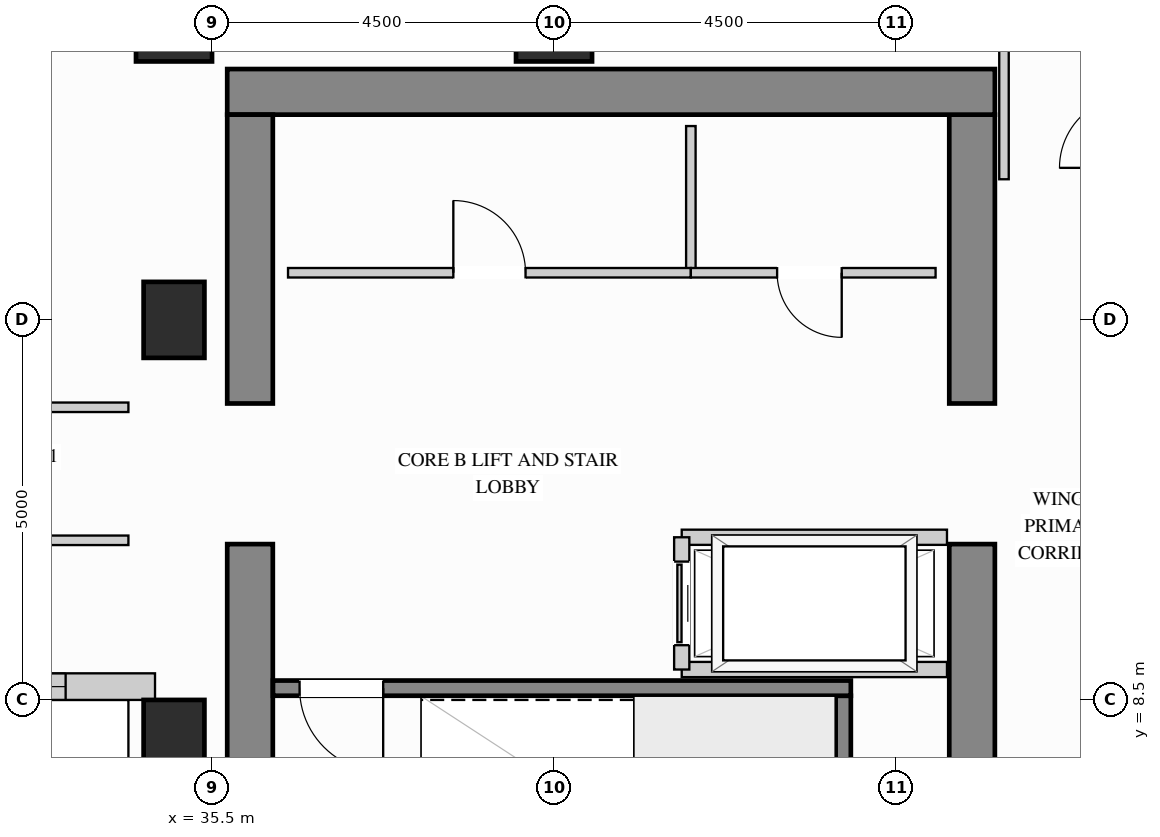
"""IFC4 building model, lengths in metres.
Left out: names, types, materials, properties, quantities, classifications, styles, units other than length and angle.
Written with IfcOpenShell. Run it as: python <this file> out.ifc"""

import sys

from ifc_helpers import new_model, si_unit, direction, frame, frame_2d, origin, origin_2d, place, context, subcontext, project, spatial, rectangle, extrude, source, transform, mapped, element, fill, save


model = new_model("IFC4")
c1 = context("Model", 3, precision=1e-05, world=origin(), true_north=direction((0.0, 1.0)))
c2 = subcontext(c1, "Body", "Model", "MODEL_VIEW")
j1 = project(units=[si_unit("LENGTHUNIT", "METRE"), si_unit("PLANEANGLEUNIT", "RADIAN")], contexts=[c1])
p1 = place(None, origin())
s1 = spatial("IfcSite", under=j1, at=p1, CompositionType="ELEMENT")
p2 = place(p1, origin())
s2 = spatial("IfcBuilding", under=s1, at=p2, CompositionType="ELEMENT")
p3 = place(p2, frame((0.0, 0.0, 186.3)))
s3 = spatial("IfcBuildingStorey", under=s2, at=p3, CompositionType="ELEMENT", Elevation=186.3)
m1 = source(origin(), c2, "Body", "SweptSolid", [
    extrude(rectangle(XDim=0.8, YDim=1.0, at=origin_2d()), origin(), (0.0, 0.0, 1.0), 3.4),
])
for number, where, z_axis, x_axis in (
    (1, (35.0, 13.5, 0.0), (0.0, 0.0, 1.0), (1.0, 0.0, 0.0)),
    (2, (35.0, 8.0, 0.0), (0.0, 0.0, 1.0), (1.0, 0.0, 0.0)),
):
    element("IfcColumn", number, at=place(p3, frame(where, z_axis=z_axis, x_axis=x_axis)), inside=s3, PredefinedType="COLUMN", context=c2, shape_type="MappedRepresentation", body=[
        mapped(m1, transform((0.0, 0.0, 0.0), x_axis=(1.0, 0.0, 0.0), y_axis=(0.0, 1.0, 0.0), z_axis=(0.0, 0.0, 1.0))),
    ])
m2 = source(origin(), c2, "Body", "SweptSolid", [
    extrude(rectangle(XDim=1.0, YDim=1.0, at=origin_2d()), origin(), (0.0, 0.0, 1.0), 3.4),
])
for number, where, z_axis, x_axis in (
    (3, (35.0, 17.4, 0.0), (0.0, 0.0, 1.0), (1.0, 0.0, 0.0)),
    (4, (40.0, 17.4, 0.0), (0.0, 0.0, 1.0), (1.0, 0.0, 0.0)),
):
    element("IfcColumn", number, at=place(p3, frame(where, z_axis=z_axis, x_axis=x_axis)), inside=s3, PredefinedType="COLUMN", context=c2, shape_type="MappedRepresentation", body=[
        mapped(m2, transform((0.0, 0.0, 0.0), x_axis=(1.0, 0.0, 0.0), y_axis=(0.0, 1.0, 0.0), z_axis=(0.0, 0.0, 1.0))),
    ])
m3 = source(origin(), c2, "Body", "SweptSolid", [
    extrude(rectangle(XDim=5.75, YDim=0.6, at=frame_2d((2.875, 0.0))), origin(), (0.0, 0.0, 1.0), 3.4),
])
p4 = place(p3, frame((45.5, 4.8, 0.0), z_axis=(0.0, 0.0, 1.0), x_axis=(0.0, 1.0, 0.0)))
e5 = element("IfcWall", 5, at=p4, inside=s3, PredefinedType="SHEAR", context=c2, shape_type="MappedRepresentation", body=[
    mapped(m3, transform((0.0, 0.0, 0.0), x_axis=(1.0, 0.0, 0.0), y_axis=(0.0, 1.0, 0.0), z_axis=(0.0, 0.0, 1.0))),
])
m4 = source(origin(), c2, "Body", "SweptSolid", [
    extrude(rectangle(XDim=3.8, YDim=0.6, at=frame_2d((1.9, 0.0))), origin(), (0.0, 0.0, 1.0), 3.4),
])
p5 = place(p3, frame((45.5, 12.4, 0.0), z_axis=(0.0, 0.0, 1.0), x_axis=(0.0, 1.0, 0.0)))
e6 = element("IfcWall", 6, at=p5, inside=s3, PredefinedType="SHEAR", context=c2, shape_type="MappedRepresentation", body=[
    mapped(m4, transform((0.0, 0.0, 0.0), x_axis=(1.0, 0.0, 0.0), y_axis=(0.0, 1.0, 0.0), z_axis=(0.0, 0.0, 1.0))),
])
m5 = source(origin(), c2, "Body", "SweptSolid", [
    extrude(rectangle(XDim=10.1, YDim=0.6, at=frame_2d((5.05, 0.0))), origin(), (0.0, 0.0, 1.0), 3.4),
])
p6 = place(p3, frame((35.7, 16.5, 0.0), z_axis=(0.0, 0.0, 1.0), x_axis=(1.0, 0.0, 0.0)))
e7 = element("IfcWall", 7, at=p6, inside=s3, PredefinedType="SHEAR", context=c2, shape_type="MappedRepresentation", body=[
    mapped(m5, transform((0.0, 0.0, 0.0), x_axis=(1.0, 0.0, 0.0), y_axis=(0.0, 1.0, 0.0), z_axis=(0.0, 0.0, 1.0))),
])
p7 = place(p3, frame((36.0, 4.8, 0.0), z_axis=(0.0, 0.0, 1.0), x_axis=(0.0, 1.0, 0.0)))
e8 = element("IfcWall", 8, at=p7, inside=s3, PredefinedType="SHEAR", context=c2, shape_type="MappedRepresentation", body=[
    mapped(m3, transform((0.0, 0.0, 0.0), x_axis=(1.0, 0.0, 0.0), y_axis=(0.0, 1.0, 0.0), z_axis=(0.0, 0.0, 1.0))),
])
p8 = place(p3, frame((36.0, 12.4, 0.0), z_axis=(0.0, 0.0, 1.0), x_axis=(0.0, 1.0, 0.0)))
e9 = element("IfcWall", 9, at=p8, inside=s3, PredefinedType="SHEAR", context=c2, shape_type="MappedRepresentation", body=[
    mapped(m4, transform((0.0, 0.0, 0.0), x_axis=(1.0, 0.0, 0.0), y_axis=(0.0, 1.0, 0.0), z_axis=(0.0, 0.0, 1.0))),
])
p9 = place(p3, frame((30.898, 8.675, 0.0), z_axis=(0.0, 0.0, 1.0), x_axis=(1.0, 0.0, 0.0)))
e10 = element("IfcWall", 10, at=p9, inside=s3, PredefinedType="SOLIDWALL", context=c2, shape_type="SweptSolid", body=[
    extrude(rectangle(XDim=3.852, YDim=0.35, at=frame_2d((1.926, 0.0))), origin(), (0.0, 0.0, 1.0), 3.385),
])
p10 = place(p9, frame((1.176, 0.0, 0.78)))
e11 = element("IfcOpeningElement", 11, at=p10, cuts=e10, PredefinedType="OPENING", context=c2, shape_type="SweptSolid", body=[
    extrude(rectangle(XDim=1.5, YDim=2.0, at=frame_2d((0.75, 1.0))), frame((0.0, 0.185, 0.0), z_axis=(0.0, -1.0, 0.0), x_axis=(1.0, 0.0, 0.0)), (0.0, 0.0, 1.0), 0.37),
])
m6 = source(origin(), c2, "Body", "SweptSolid", [
    extrude(rectangle(XDim=1.93, YDim=0.125, at=frame_2d((0.965, 0.0))), origin(), (0.0, 0.0, 1.0), 3.385),
])
p11 = place(p3, frame((41.8, 14.12, 0.0), z_axis=(0.0, 0.0, 1.0), x_axis=(0.0, 1.0, 0.0)))
e12 = element("IfcWall", 12, at=p11, inside=s3, PredefinedType="PARTITIONING", context=c2, shape_type="MappedRepresentation", body=[
    mapped(m6, transform((0.0, 0.0, 0.0), x_axis=(1.0, 0.0, 0.0), y_axis=(0.0, 1.0, 0.0), z_axis=(0.0, 0.0, 1.0))),
])
p12 = place(p3, frame((36.5, 14.12, 0.0), z_axis=(0.0, 0.0, 1.0), x_axis=(1.0, 0.0, 0.0)))
e13 = element("IfcWall", 13, at=p12, inside=s3, PredefinedType="PARTITIONING", context=c2, shape_type="SweptSolid", body=[
    extrude(rectangle(XDim=5.3, YDim=0.125, at=frame_2d((2.65, 0.0))), origin(), (0.0, 0.0, 1.0), 3.385),
])
p13 = place(p12, frame((2.175, 0.0, 0.0)))
e14 = element("IfcOpeningElement", 14, at=p13, cuts=e13, PredefinedType="OPENING", context=c2, shape_type="SweptSolid", body=[
    extrude(rectangle(XDim=0.95, YDim=2.15, at=frame_2d((0.475, 1.075))), frame((0.0, 0.073, 0.0), z_axis=(0.0, -1.0, 0.0), x_axis=(1.0, 0.0, 0.0)), (0.0, 0.0, 1.0), 0.145),
])
p14 = place(p3, frame((41.8, 14.12, 0.0), z_axis=(0.0, 0.0, 1.0), x_axis=(1.0, 0.0, 0.0)))
e15 = element("IfcWall", 15, at=p14, inside=s3, PredefinedType="PARTITIONING", context=c2, shape_type="SweptSolid", body=[
    extrude(rectangle(XDim=3.22, YDim=0.125, at=frame_2d((1.61, 0.0))), origin(), (0.0, 0.0, 1.0), 3.385),
])
p15 = place(p14, frame((1.135, 0.0, 0.0)))
e16 = element("IfcOpeningElement", 16, at=p15, cuts=e15, PredefinedType="OPENING", context=c2, shape_type="SweptSolid", body=[
    extrude(rectangle(XDim=0.85, YDim=2.1, at=frame_2d((0.425, 1.05))), frame((0.0, 0.073, 0.0), z_axis=(0.0, -1.0, 0.0), x_axis=(1.0, 0.0, 0.0)), (0.0, 0.0, 1.0), 0.145),
])
m7 = source(origin(), c2, "Body", "SweptSolid", [
    extrude(rectangle(XDim=2.298, YDim=0.125, at=frame_2d((1.149, 0.0))), origin(), (0.0, 0.0, 1.0), 3.385),
])
p16 = place(p3, frame((45.92, 15.35, 0.0), z_axis=(0.0, 0.0, 1.0), x_axis=(0.0, 1.0, 0.0)))
e17 = element("IfcWall", 17, at=p16, inside=s3, PredefinedType="PARTITIONING", context=c2, shape_type="MappedRepresentation", body=[
    mapped(m7, transform((0.0, 0.0, 0.0), x_axis=(1.0, 0.0, 0.0), y_axis=(0.0, 1.0, 0.0), z_axis=(0.0, 0.0, 1.0))),
])
p17 = place(p3, frame((29.85, 12.35, 0.0), z_axis=(0.0, 0.0, 1.0), x_axis=(1.0, 0.0, 0.0)))
e18 = element("IfcWall", 18, at=p17, inside=s3, PredefinedType="PARTITIONING", context=c2, shape_type="SweptSolid", body=[
    extrude(rectangle(XDim=4.55, YDim=0.125, at=frame_2d((2.275, 0.0))), origin(), (0.0, 0.0, 1.0), 3.385),
])
p18 = place(p17, frame((1.8, 0.0, 0.0)))
e19 = element("IfcOpeningElement", 19, at=p18, cuts=e18, PredefinedType="OPENING", context=c2, shape_type="SweptSolid", body=[
    extrude(rectangle(XDim=0.95, YDim=2.15, at=frame_2d((0.475, 1.075))), frame((0.0, 0.073, 0.0), z_axis=(0.0, -1.0, 0.0), x_axis=(1.0, 0.0, 0.0)), (0.0, 0.0, 1.0), 0.145),
])
p19 = place(p3, frame((29.85, 10.6, 0.0), z_axis=(0.0, 0.0, 1.0), x_axis=(1.0, 0.0, 0.0)))
e20 = element("IfcWall", 20, at=p19, inside=s3, PredefinedType="PARTITIONING", context=c2, shape_type="SweptSolid", body=[
    extrude(rectangle(XDim=4.55, YDim=0.125, at=frame_2d((2.275, 0.0))), origin(), (0.0, 0.0, 1.0), 3.385),
])
p20 = place(p19, frame((1.8, 0.0, 0.0)))
e21 = element("IfcOpeningElement", 21, at=p20, cuts=e20, PredefinedType="OPENING", context=c2, shape_type="SweptSolid", body=[
    extrude(rectangle(XDim=0.95, YDim=2.15, at=frame_2d((0.475, 1.075))), frame((0.0, 0.073, 0.0), z_axis=(0.0, -1.0, 0.0), x_axis=(1.0, 0.0, 0.0)), (0.0, 0.0, 1.0), 0.145),
])
m8 = source(origin(), c2, "Body", "SweptSolid", [
    extrude(rectangle(XDim=3.49, YDim=0.2, at=frame_2d((1.745, 0.0))), origin(), (0.0, 0.0, 1.0), 3.385),
])
for number, where, z_axis, x_axis in (
    (22, (41.68, 10.64, 0.0), (0.0, 0.0, 1.0), (1.0, 0.0, 0.0)),
    (23, (41.68, 8.9, 0.0), (0.0, 0.0, 1.0), (1.0, 0.0, 0.0)),
):
    element("IfcWall", number, at=place(p3, frame(where, z_axis=z_axis, x_axis=x_axis)), inside=s3, PredefinedType="PARTITIONING", context=c2, shape_type="MappedRepresentation", body=[
        mapped(m8, transform((0.0, 0.0, 0.0), x_axis=(1.0, 0.0, 0.0), y_axis=(0.0, 1.0, 0.0), z_axis=(0.0, 0.0, 1.0))),
    ])
p21 = place(p3, frame((41.68, 8.9, 0.0), z_axis=(0.0, 0.0, 1.0), x_axis=(0.0, 1.0, 0.0)))
e24 = element("IfcWall", 24, at=p21, inside=s3, PredefinedType="PARTITIONING", context=c2, shape_type="SweptSolid", body=[
    extrude(rectangle(XDim=1.74, YDim=0.2, at=frame_2d((0.87, 0.0))), origin(), (0.0, 0.0, 1.0), 3.385),
])
p22 = place(p21, frame((0.32, 0.0, 0.0)))
e25 = element("IfcOpeningElement", 25, at=p22, cuts=e24, PredefinedType="OPENING", context=c2, shape_type="SweptSolid", body=[
    extrude(rectangle(XDim=1.1, YDim=2.2, at=frame_2d((0.55, 1.1))), frame((0.0, 0.11, 0.0), z_axis=(0.0, -1.0, 0.0), x_axis=(1.0, 0.0, 0.0)), (0.0, 0.0, 1.0), 0.22),
])
m9 = source(origin(), c2, "Body", "SweptSolid", [
    extrude(rectangle(XDim=3.753, YDim=0.2, at=frame_2d((1.876, 0.0))), origin(), (0.0, 0.0, 1.0), 3.4),
])
p23 = place(p3, frame((43.805, 4.802, 0.0), z_axis=(0.0, 0.0, 1.0), x_axis=(0.0, 1.0, 0.0)))
e26 = element("IfcWall", 26, at=p23, inside=s3, PredefinedType="SHEAR", context=c2, shape_type="MappedRepresentation", body=[
    mapped(m9, transform((0.0, 0.0, 0.0), x_axis=(1.0, 0.0, 0.0), y_axis=(0.0, 1.0, 0.0), z_axis=(0.0, 0.0, 1.0))),
])
p24 = place(p3, frame((36.302, 8.655, 0.0), z_axis=(0.0, 0.0, 1.0), x_axis=(1.0, 0.0, 0.0)))
e27 = element("IfcWall", 27, at=p24, inside=s3, PredefinedType="SHEAR", context=c2, shape_type="SweptSolid", body=[
    extrude(rectangle(XDim=7.603, YDim=0.2, at=frame_2d((3.802, 0.0))), origin(), (0.0, 0.0, 1.0), 3.4),
])
p25 = place(p24, frame((0.35, 0.0, 0.0)))
e28 = element("IfcOpeningElement", 28, at=p25, cuts=e27, PredefinedType="OPENING", context=c2, shape_type="SweptSolid", body=[
    extrude(rectangle(XDim=1.1, YDim=2.15, at=frame_2d((0.55, 1.075))), frame((0.0, 0.11, 0.0), z_axis=(0.0, -1.0, 0.0), x_axis=(1.0, 0.0, 0.0)), (0.0, 0.0, 1.0), 0.22),
])
m10 = source(origin(), c2, "Body", "SweptSolid", [
    extrude(rectangle(XDim=1.1, YDim=2.2, at=frame_2d((0.55, 1.1))), frame((0.0, 0.025, 0.0), z_axis=(0.0, -1.0, 0.0), x_axis=(1.0, 0.0, 0.0)), (0.0, 0.0, 1.0), 0.05),
])
p26 = place(p22, origin())
e29 = element("IfcDoor", 29, at=p26, inside=s3, OperationType="SLIDING_TO_LEFT", PredefinedType="DOOR", context=c2, shape_type="MappedRepresentation", body=[
    mapped(m10, transform((0.0, 0.0, 0.0), x_axis=(1.0, 0.0, 0.0), y_axis=(0.0, 1.0, 0.0), z_axis=(0.0, 0.0, 1.0))),
])
fill(e25, e29)
m11 = source(origin(), c2, "Body", "SweptSolid", [
    extrude(rectangle(XDim=0.95, YDim=2.15, at=frame_2d((0.475, 1.075))), frame((0.0, 0.025, 0.0), z_axis=(0.0, -1.0, 0.0), x_axis=(1.0, 0.0, 0.0)), (0.0, 0.0, 1.0), 0.05),
])
p27 = place(p13, origin())
e30 = element("IfcDoor", 30, at=p27, inside=s3, OperationType="SINGLE_SWING_LEFT", PredefinedType="DOOR", context=c2, shape_type="MappedRepresentation", body=[
    mapped(m11, transform((0.0, 0.0, 0.0), x_axis=(1.0, 0.0, 0.0), y_axis=(0.0, 1.0, 0.0), z_axis=(0.0, 0.0, 1.0))),
])
fill(e14, e30)
m12 = source(origin(), c2, "Body", "SweptSolid", [
    extrude(rectangle(XDim=0.85, YDim=2.1, at=frame_2d((0.425, 1.05))), frame((0.0, 0.025, 0.0), z_axis=(0.0, -1.0, 0.0), x_axis=(1.0, 0.0, 0.0)), (0.0, 0.0, 1.0), 0.05),
])
p28 = place(p15, origin())
e31 = element("IfcDoor", 31, at=p28, inside=s3, OperationType="SINGLE_SWING_RIGHT", PredefinedType="DOOR", context=c2, shape_type="MappedRepresentation", body=[
    mapped(m12, transform((0.0, 0.0, 0.0), x_axis=(1.0, 0.0, 0.0), y_axis=(0.0, 1.0, 0.0), z_axis=(0.0, 0.0, 1.0))),
])
fill(e16, e31)
m13 = source(origin(), c2, "Body", "SweptSolid", [
    extrude(rectangle(XDim=1.1, YDim=2.15, at=frame_2d((0.55, 1.075))), frame((0.0, 0.025, 0.0), z_axis=(0.0, -1.0, 0.0), x_axis=(1.0, 0.0, 0.0)), (0.0, 0.0, 1.0), 0.05),
])
p29 = place(p25, origin())
e32 = element("IfcDoor", 32, at=p29, inside=s3, OperationType="SINGLE_SWING_RIGHT", PredefinedType="DOOR", context=c2, shape_type="MappedRepresentation", body=[
    mapped(m13, transform((0.0, 0.0, 0.0), x_axis=(1.0, 0.0, 0.0), y_axis=(0.0, 1.0, 0.0), z_axis=(0.0, 0.0, 1.0))),
])
fill(e28, e32)
m14 = source(origin(), c2, "Body", "SweptSolid", [
    extrude(rectangle(XDim=1.5, YDim=2.0, at=frame_2d((0.75, 1.0))), frame((0.0, 0.03, 0.0), z_axis=(0.0, -1.0, 0.0), x_axis=(1.0, 0.0, 0.0)), (0.0, 0.0, 1.0), 0.06),
])
p30 = place(p10, origin())
e33 = element("IfcWindow", 33, at=p30, inside=s3, PartitioningType="SINGLE_PANEL", PredefinedType="WINDOW", context=c2, shape_type="MappedRepresentation", body=[
    mapped(m14, transform((0.0, 0.0, 0.0), x_axis=(1.0, 0.0, 0.0), y_axis=(0.0, 1.0, 0.0), z_axis=(0.0, 0.0, 1.0))),
])
fill(e11, e33)
save(model, sys.argv[1])
